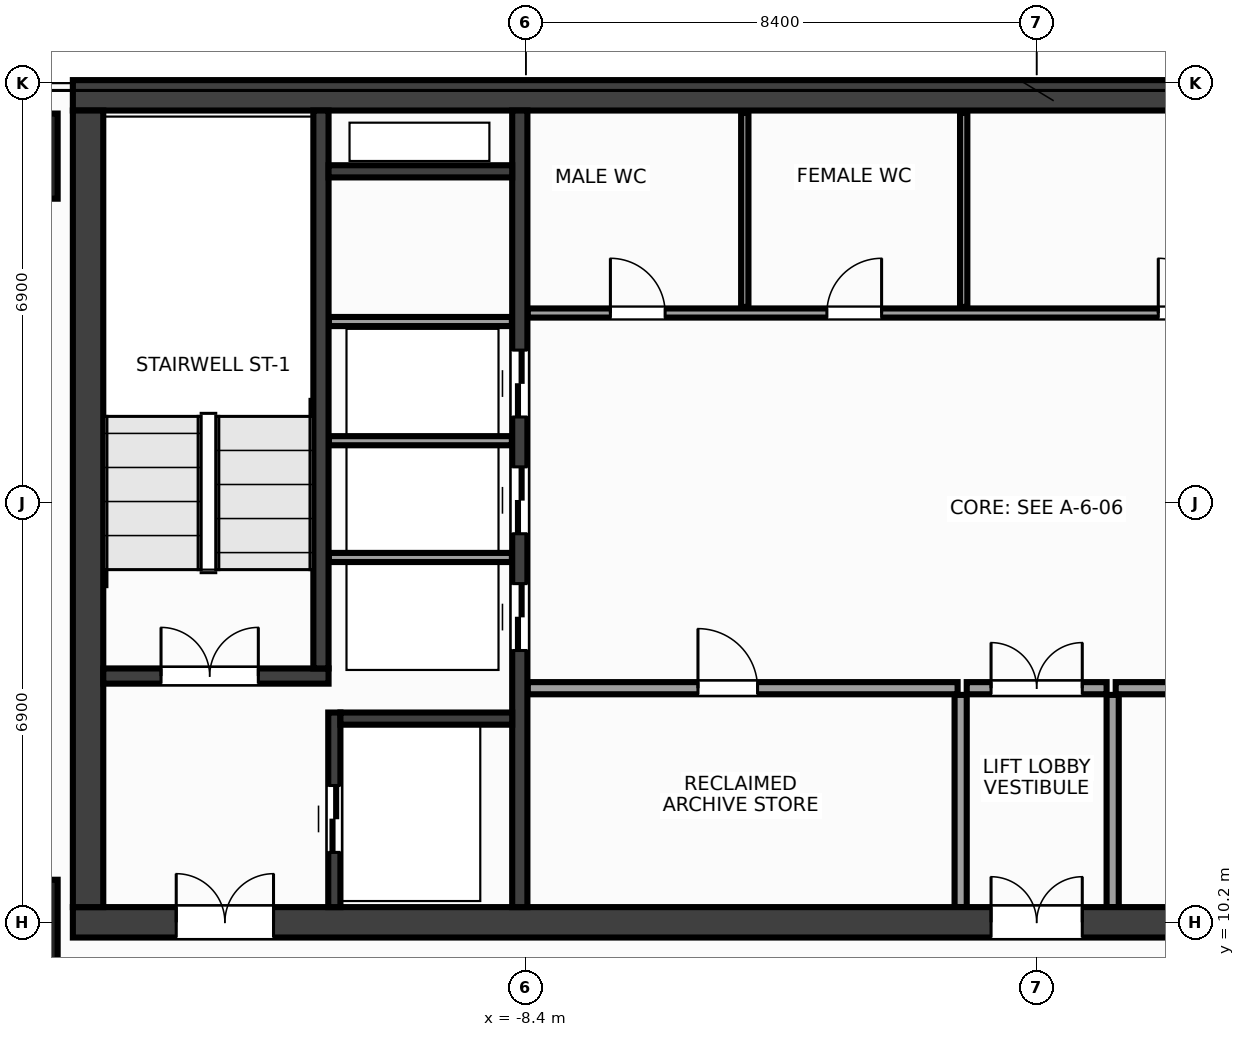
"""IFC4 building model, lengths in metres.
Left out: names, types, materials, properties, quantities, classifications, styles, units other than length and angle.
Written with IfcOpenShell. Run it as: python <this file> out.ifc"""

import sys

from ifc_helpers import new_model, si_unit, direction, frame, frame_2d, origin, origin_2d, place, context, subcontext, project, spatial, rectangle, extrude, source, transform, mapped, element, fill, save


model = new_model("IFC4")
c1 = context("Model", 3, precision=1e-05, world=origin(), true_north=direction((0.0, 1.0)))
c2 = subcontext(c1, "Body", "Model", "MODEL_VIEW")
j1 = project(units=[si_unit("LENGTHUNIT", "METRE"), si_unit("PLANEANGLEUNIT", "RADIAN")], contexts=[c1])
p1 = place(None, origin())
s1 = spatial("IfcSite", under=j1, at=p1, CompositionType="ELEMENT")
p2 = place(p1, origin())
s2 = spatial("IfcBuilding", under=s1, at=p2, CompositionType="ELEMENT")
p3 = place(p2, frame((0.0, 0.0, 203.6)))
s3 = spatial("IfcBuildingStorey", under=s2, at=p3, CompositionType="ELEMENT", Elevation=203.6)
m1 = source(origin(), c2, "Body", "SweptSolid", [
    extrude(rectangle(XDim=31.7, YDim=0.5, at=frame_2d((15.85, 0.0))), origin(), (0.0, 0.0, 1.0), 3.6),
])
p4 = place(p3, frame((-15.85, 23.8, 0.0), z_axis=(0.0, 0.0, 1.0), x_axis=(1.0, 0.0, 0.0)))
e1 = element("IfcWall", 1, at=p4, inside=s3, PredefinedType="SHEAR", context=c2, shape_type="MappedRepresentation", body=[
    mapped(m1, transform((0.0, 0.0, 0.0), x_axis=(1.0, 0.0, 0.0), y_axis=(0.0, 1.0, 0.0), z_axis=(0.0, 0.0, 1.0), scale=1.0)),
])
p5 = place(p3, frame((-15.85, 10.2, 0.0), z_axis=(0.0, 0.0, 1.0), x_axis=(1.0, 0.0, 0.0)))
e2 = element("IfcWall", 2, at=p5, inside=s3, PredefinedType="SHEAR", context=c2, shape_type="MappedRepresentation", body=[
    mapped(m1, transform((0.0, 0.0, 0.0), x_axis=(1.0, 0.0, 0.0), y_axis=(0.0, 1.0, 0.0), z_axis=(0.0, 0.0, 1.0), scale=1.0)),
])
p6 = place(p5, frame((1.7, 0.0, 0.0)))
e3 = element("IfcOpeningElement", 3, at=p6, cuts=e2, PredefinedType="OPENING", context=c2, shape_type="SweptSolid", body=[
    extrude(rectangle(XDim=1.6, YDim=2.15, at=frame_2d((0.8, 1.075))), frame((0.0, 0.262, 0.0), z_axis=(0.0, -1.0, 0.0), x_axis=(1.0, 0.0, 0.0)), (0.0, 0.0, 1.0), 0.524),
])
p7 = place(p5, frame((28.4, 0.0, 0.0)))
e4 = element("IfcOpeningElement", 4, at=p7, cuts=e2, PredefinedType="OPENING", context=c2, shape_type="SweptSolid", body=[
    extrude(rectangle(XDim=1.6, YDim=2.15, at=frame_2d((0.8, 1.075))), frame((0.0, 0.262, 0.0), z_axis=(0.0, -1.0, 0.0), x_axis=(1.0, 0.0, 0.0)), (0.0, 0.0, 1.0), 0.524),
])
p8 = place(p5, frame((15.1, 0.0, 0.0)))
e5 = element("IfcOpeningElement", 5, at=p8, cuts=e2, PredefinedType="OPENING", context=c2, shape_type="SweptSolid", body=[
    extrude(rectangle(XDim=1.5, YDim=2.2, at=frame_2d((0.75, 1.1))), frame((0.0, 0.262, 0.0), z_axis=(0.0, -1.0, 0.0), x_axis=(1.0, 0.0, 0.0)), (0.0, 0.0, 1.0), 0.524),
])
m2 = source(origin(), c2, "Body", "SweptSolid", [
    extrude(rectangle(XDim=13.1, YDim=0.5, at=frame_2d((6.55, 0.0))), origin(), (0.0, 0.0, 1.0), 3.6),
])
p9 = place(p3, frame((-15.6, 10.45, 0.0), z_axis=(0.0, 0.0, 1.0), x_axis=(0.0, 1.0, 0.0)))
e6 = element("IfcWall", 6, at=p9, inside=s3, PredefinedType="SHEAR", context=c2, shape_type="MappedRepresentation", body=[
    mapped(m2, transform((0.0, 0.0, 0.0), x_axis=(1.0, 0.0, 0.0), y_axis=(0.0, 1.0, 0.0), z_axis=(0.0, 0.0, 1.0), scale=1.0)),
])
m3 = source(origin(), c2, "Body", "SweptSolid", [
    extrude(rectangle(XDim=13.1, YDim=0.25, at=frame_2d((6.55, 0.0))), origin(), (0.0, 0.0, 1.0), 3.6),
])
p10 = place(p3, frame((-8.5, 10.45, 0.0), z_axis=(0.0, 0.0, 1.0), x_axis=(0.0, 1.0, 0.0)))
e7 = element("IfcWall", 7, at=p10, inside=s3, PredefinedType="SHEAR", context=c2, shape_type="MappedRepresentation", body=[
    mapped(m3, transform((0.0, 0.0, 0.0), x_axis=(1.0, 0.0, 0.0), y_axis=(0.0, 1.0, 0.0), z_axis=(0.0, 0.0, 1.0), scale=1.0)),
])
p11 = place(p10, frame((4.22, 0.0, 0.0)))
e8 = element("IfcOpeningElement", 8, at=p11, cuts=e7, PredefinedType="OPENING", context=c2, shape_type="SweptSolid", body=[
    extrude(rectangle(XDim=1.1, YDim=2.15, at=frame_2d((0.55, 1.075))), frame((0.0, 0.137, 0.0), z_axis=(0.0, -1.0, 0.0), x_axis=(1.0, 0.0, 0.0)), (0.0, 0.0, 1.0), 0.274),
])
p12 = place(p10, frame((6.14, 0.0, 0.0)))
e9 = element("IfcOpeningElement", 9, at=p12, cuts=e7, PredefinedType="OPENING", context=c2, shape_type="SweptSolid", body=[
    extrude(rectangle(XDim=1.1, YDim=2.15, at=frame_2d((0.55, 1.075))), frame((0.0, 0.137, 0.0), z_axis=(0.0, -1.0, 0.0), x_axis=(1.0, 0.0, 0.0)), (0.0, 0.0, 1.0), 0.274),
])
p13 = place(p10, frame((8.06, 0.0, 0.0)))
e10 = element("IfcOpeningElement", 10, at=p13, cuts=e7, PredefinedType="OPENING", context=c2, shape_type="SweptSolid", body=[
    extrude(rectangle(XDim=1.1, YDim=2.15, at=frame_2d((0.55, 1.075))), frame((0.0, 0.137, 0.0), z_axis=(0.0, -1.0, 0.0), x_axis=(1.0, 0.0, 0.0)), (0.0, 0.0, 1.0), 0.274),
])
m4 = source(origin(), c2, "Body", "SweptSolid", [
    extrude(rectangle(XDim=3.705, YDim=0.25, at=frame_2d((1.853, 0.0))), origin(), (0.0, 0.0, 1.0), 3.6),
])
p14 = place(p3, frame((-15.35, 14.25, 0.0), z_axis=(0.0, 0.0, 1.0), x_axis=(1.0, 0.0, 0.0)))
e11 = element("IfcWall", 11, at=p14, inside=s3, PredefinedType="SHEAR", context=c2, shape_type="MappedRepresentation", body=[
    mapped(m4, transform((0.0, 0.0, 0.0), x_axis=(1.0, 0.0, 0.0), y_axis=(0.0, 1.0, 0.0), z_axis=(0.0, 0.0, 1.0), scale=1.0)),
])
p15 = place(p14, frame((0.95, 0.0, 0.0)))
e12 = element("IfcOpeningElement", 12, at=p15, cuts=e11, PredefinedType="OPENING", context=c2, shape_type="SweptSolid", body=[
    extrude(rectangle(XDim=1.6, YDim=2.15, at=frame_2d((0.8, 1.075))), frame((0.0, 0.137, 0.0), z_axis=(0.0, -1.0, 0.0), x_axis=(1.0, 0.0, 0.0)), (0.0, 0.0, 1.0), 0.274),
])
m5 = source(origin(), c2, "Body", "SweptSolid", [
    extrude(rectangle(XDim=9.175, YDim=0.25, at=frame_2d((4.587, 0.0))), origin(), (0.0, 0.0, 1.0), 3.6),
])
p16 = place(p3, frame((-11.77, 14.375, 0.0), z_axis=(0.0, 0.0, 1.0), x_axis=(0.0, 1.0, 0.0)))
e13 = element("IfcWall", 13, at=p16, inside=s3, PredefinedType="SHEAR", context=c2, shape_type="MappedRepresentation", body=[
    mapped(m5, transform((0.0, 0.0, 0.0), x_axis=(1.0, 0.0, 0.0), y_axis=(0.0, 1.0, 0.0), z_axis=(0.0, 0.0, 1.0), scale=1.0)),
])
m6 = source(origin(), c2, "Body", "SweptSolid", [
    extrude(rectangle(XDim=3.2, YDim=0.2, at=frame_2d((1.6, 0.0))), origin(), (0.0, 0.0, 1.0), 3.6),
])
p17 = place(p3, frame((-11.55, 10.45, 0.0), z_axis=(0.0, 0.0, 1.0), x_axis=(0.0, 1.0, 0.0)))
e14 = element("IfcWall", 14, at=p17, inside=s3, PredefinedType="SHEAR", context=c2, shape_type="MappedRepresentation", body=[
    mapped(m6, transform((0.0, 0.0, 0.0), x_axis=(1.0, 0.0, 0.0), y_axis=(0.0, 1.0, 0.0), z_axis=(0.0, 0.0, 1.0), scale=1.0)),
])
p18 = place(p17, frame((0.9, 0.0, 0.0)))
e15 = element("IfcOpeningElement", 15, at=p18, cuts=e14, PredefinedType="OPENING", context=c2, shape_type="SweptSolid", body=[
    extrude(rectangle(XDim=1.1, YDim=2.15, at=frame_2d((0.55, 1.075))), frame((0.0, 0.112, 0.0), z_axis=(0.0, -1.0, 0.0), x_axis=(1.0, 0.0, 0.0)), (0.0, 0.0, 1.0), 0.224),
])
m7 = source(origin(), c2, "Body", "SweptSolid", [
    extrude(rectangle(XDim=2.825, YDim=0.2, at=frame_2d((1.413, 0.0))), origin(), (0.0, 0.0, 1.0), 3.6),
])
p19 = place(p3, frame((-11.45, 13.55, 0.0), z_axis=(0.0, 0.0, 1.0), x_axis=(1.0, 0.0, 0.0)))
e16 = element("IfcWall", 16, at=p19, inside=s3, PredefinedType="SHEAR", context=c2, shape_type="MappedRepresentation", body=[
    mapped(m7, transform((0.0, 0.0, 0.0), x_axis=(1.0, 0.0, 0.0), y_axis=(0.0, 1.0, 0.0), z_axis=(0.0, 0.0, 1.0), scale=1.0)),
])
m8 = source(origin(), c2, "Body", "SweptSolid", [
    extrude(rectangle(XDim=3.02, YDim=0.2, at=frame_2d((1.51, 0.0))), origin(), (0.0, 0.0, 1.0), 3.6),
])
p20 = place(p3, frame((-11.645, 22.55, 0.0), z_axis=(0.0, 0.0, 1.0), x_axis=(1.0, 0.0, 0.0)))
e17 = element("IfcWall", 17, at=p20, inside=s3, PredefinedType="SHEAR", context=c2, shape_type="MappedRepresentation", body=[
    mapped(m8, transform((0.0, 0.0, 0.0), x_axis=(1.0, 0.0, 0.0), y_axis=(0.0, 1.0, 0.0), z_axis=(0.0, 0.0, 1.0), scale=1.0)),
])
m9 = source(origin(), c2, "Body", "SweptSolid", [
    extrude(rectangle(XDim=1.4, YDim=1.4, at=origin_2d()), origin(), (0.0, 0.0, 1.0), 3.6),
])
for number, where, z_axis, x_axis in (
    (18, (-16.8, 10.2, 0.0), (0.0, 0.0, 1.0), (1.0, 0.0, 0.0)),
    (19, (-16.8, 22.8, 0.0), (0.0, 0.0, 1.0), (1.0, 0.0, 0.0)),
):
    element("IfcColumn", number, at=place(p3, frame(where, z_axis=z_axis, x_axis=x_axis)), inside=s3, PredefinedType="COLUMN", context=c2, shape_type="MappedRepresentation", body=[
        mapped(m9, transform((0.0, 0.0, 0.0), x_axis=(1.0, 0.0, 0.0), y_axis=(0.0, 1.0, 0.0), z_axis=(0.0, 0.0, 1.0), scale=1.0)),
    ])
m10 = source(origin(), c2, "Body", "SweptSolid", [
    extrude(rectangle(XDim=3.01, YDim=0.15, at=frame_2d((1.505, 0.0))), origin(), (0.0, 0.0, 1.0), 3.38),
])
for number, where, z_axis, x_axis in (
    (20, (-11.64, 16.2, 0.0), (0.0, 0.0, 1.0), (1.0, 0.0, 0.0)),
    (21, (-11.64, 18.12, 0.0), (0.0, 0.0, 1.0), (1.0, 0.0, 0.0)),
    (22, (-11.64, 20.08, 0.0), (0.0, 0.0, 1.0), (1.0, 0.0, 0.0)),
):
    element("IfcWall", number, at=place(p3, frame(where, z_axis=z_axis, x_axis=x_axis)), inside=s3, PredefinedType="PARTITIONING", context=c2, shape_type="MappedRepresentation", body=[
        mapped(m10, transform((0.0, 0.0, 0.0), x_axis=(1.0, 0.0, 0.0), y_axis=(0.0, 1.0, 0.0), z_axis=(0.0, 0.0, 1.0), scale=1.0)),
    ])
m11 = source(origin(), c2, "Body", "SweptSolid", [
    extrude(rectangle(XDim=7.07, YDim=0.2, at=frame_2d((3.535, 0.0))), origin(), (0.0, 0.0, 1.0), 3.38),
])
p21 = place(p3, frame((-8.37, 14.05, 0.0), z_axis=(0.0, 0.0, 1.0), x_axis=(1.0, 0.0, 0.0)))
e23 = element("IfcWall", 23, at=p21, inside=s3, PredefinedType="PARTITIONING", context=c2, shape_type="MappedRepresentation", body=[
    mapped(m11, transform((0.0, 0.0, 0.0), x_axis=(1.0, 0.0, 0.0), y_axis=(0.0, 1.0, 0.0), z_axis=(0.0, 0.0, 1.0), scale=1.0)),
])
p22 = place(p21, frame((2.8, 0.0, 0.0)))
e24 = element("IfcOpeningElement", 24, at=p22, cuts=e23, PredefinedType="OPENING", context=c2, shape_type="SweptSolid", body=[
    extrude(rectangle(XDim=0.98, YDim=2.15, at=frame_2d((0.49, 1.075))), frame((0.0, 0.112, 0.0), z_axis=(0.0, -1.0, 0.0), x_axis=(1.0, 0.0, 0.0)), (0.0, 0.0, 1.0), 0.224),
])
p23 = place(p3, frame((1.3, 14.05, 0.0), z_axis=(0.0, 0.0, 1.0), x_axis=(1.0, 0.0, 0.0)))
e25 = element("IfcWall", 25, at=p23, inside=s3, PredefinedType="PARTITIONING", context=c2, shape_type="MappedRepresentation", body=[
    mapped(m11, transform((0.0, 0.0, 0.0), x_axis=(1.0, 0.0, 0.0), y_axis=(0.0, 1.0, 0.0), z_axis=(0.0, 0.0, 1.0), scale=1.0)),
])
p24 = place(p23, frame((2.8, 0.0, 0.0)))
e26 = element("IfcOpeningElement", 26, at=p24, cuts=e25, PredefinedType="OPENING", context=c2, shape_type="SweptSolid", body=[
    extrude(rectangle(XDim=0.98, YDim=2.15, at=frame_2d((0.49, 1.075))), frame((0.0, 0.112, 0.0), z_axis=(0.0, -1.0, 0.0), x_axis=(1.0, 0.0, 0.0)), (0.0, 0.0, 1.0), 0.224),
])
m12 = source(origin(), c2, "Body", "SweptSolid", [
    extrude(rectangle(XDim=3.49, YDim=0.2, at=frame_2d((1.745, 0.0))), origin(), (0.0, 0.0, 1.0), 3.38),
])
for number, where, z_axis, x_axis in (
    (27, (-1.25, 10.45, 0.0), (0.0, 0.0, 1.0), (0.0, 1.0, 0.0)),
    (28, (1.25, 10.45, 0.0), (0.0, 0.0, 1.0), (0.0, 1.0, 0.0)),
):
    element("IfcWall", number, at=place(p3, frame(where, z_axis=z_axis, x_axis=x_axis)), inside=s3, PredefinedType="PARTITIONING", context=c2, shape_type="MappedRepresentation", body=[
        mapped(m12, transform((0.0, 0.0, 0.0), x_axis=(1.0, 0.0, 0.0), y_axis=(0.0, 1.0, 0.0), z_axis=(0.0, 0.0, 1.0), scale=1.0)),
    ])
m13 = source(origin(), c2, "Body", "SweptSolid", [
    extrude(rectangle(XDim=2.3, YDim=0.2, at=frame_2d((1.15, 0.0))), origin(), (0.0, 0.0, 1.0), 3.38),
])
p25 = place(p3, frame((-1.15, 14.05, 0.0), z_axis=(0.0, 0.0, 1.0), x_axis=(1.0, 0.0, 0.0)))
e29 = element("IfcWall", 29, at=p25, inside=s3, PredefinedType="PARTITIONING", context=c2, shape_type="MappedRepresentation", body=[
    mapped(m13, transform((0.0, 0.0, 0.0), x_axis=(1.0, 0.0, 0.0), y_axis=(0.0, 1.0, 0.0), z_axis=(0.0, 0.0, 1.0), scale=1.0)),
])
p26 = place(p25, frame((0.4, 0.0, 0.0)))
e30 = element("IfcOpeningElement", 30, at=p26, cuts=e29, PredefinedType="OPENING", context=c2, shape_type="SweptSolid", body=[
    extrude(rectangle(XDim=1.5, YDim=2.2, at=frame_2d((0.75, 1.1))), frame((0.0, 0.112, 0.0), z_axis=(0.0, -1.0, 0.0), x_axis=(1.0, 0.0, 0.0)), (0.0, 0.0, 1.0), 0.224),
])
m14 = source(origin(), c2, "Body", "SweptSolid", [
    extrude(rectangle(XDim=14.59, YDim=0.15, at=frame_2d((7.295, 0.0))), origin(), (0.0, 0.0, 1.0), 3.38),
])
p27 = place(p3, frame((-8.37, 20.22, 0.0), z_axis=(0.0, 0.0, 1.0), x_axis=(1.0, 0.0, 0.0)))
e31 = element("IfcWall", 31, at=p27, inside=s3, PredefinedType="PARTITIONING", context=c2, shape_type="MappedRepresentation", body=[
    mapped(m14, transform((0.0, 0.0, 0.0), x_axis=(1.0, 0.0, 0.0), y_axis=(0.0, 1.0, 0.0), z_axis=(0.0, 0.0, 1.0), scale=1.0)),
])
p28 = place(p27, frame((1.36, 0.0, 0.0)))
e32 = element("IfcOpeningElement", 32, at=p28, cuts=e31, PredefinedType="OPENING", context=c2, shape_type="SweptSolid", body=[
    extrude(rectangle(XDim=0.9, YDim=2.15, at=frame_2d((0.45, 1.075))), frame((0.0, 0.087, 0.0), z_axis=(0.0, -1.0, 0.0), x_axis=(1.0, 0.0, 0.0)), (0.0, 0.0, 1.0), 0.174),
])
p29 = place(p27, frame((4.92, 0.0, 0.0)))
e33 = element("IfcOpeningElement", 33, at=p29, cuts=e31, PredefinedType="OPENING", context=c2, shape_type="SweptSolid", body=[
    extrude(rectangle(XDim=0.9, YDim=2.15, at=frame_2d((0.45, 1.075))), frame((0.0, 0.087, 0.0), z_axis=(0.0, -1.0, 0.0), x_axis=(1.0, 0.0, 0.0)), (0.0, 0.0, 1.0), 0.174),
])
p30 = place(p27, frame((10.37, 0.0, 0.0)))
e34 = element("IfcOpeningElement", 34, at=p30, cuts=e31, PredefinedType="OPENING", context=c2, shape_type="SweptSolid", body=[
    extrude(rectangle(XDim=0.9, YDim=2.15, at=frame_2d((0.45, 1.075))), frame((0.0, 0.087, 0.0), z_axis=(0.0, -1.0, 0.0), x_axis=(1.0, 0.0, 0.0)), (0.0, 0.0, 1.0), 0.174),
])
m15 = source(origin(), c2, "Body", "SweptSolid", [
    extrude(rectangle(XDim=3.19, YDim=0.12, at=frame_2d((1.595, 0.0))), origin(), (0.0, 0.0, 1.0), 3.38),
])
for number, where, z_axis, x_axis in (
    (35, (-4.8, 20.32, 0.0), (0.0, 0.0, 1.0), (0.0, 1.0, 0.0)),
    (36, (-1.2, 20.32, 0.0), (0.0, 0.0, 1.0), (0.0, 1.0, 0.0)),
):
    element("IfcWall", number, at=place(p3, frame(where, z_axis=z_axis, x_axis=x_axis)), inside=s3, PredefinedType="PARTITIONING", context=c2, shape_type="MappedRepresentation", body=[
        mapped(m15, transform((0.0, 0.0, 0.0), x_axis=(1.0, 0.0, 0.0), y_axis=(0.0, 1.0, 0.0), z_axis=(0.0, 0.0, 1.0), scale=1.0)),
    ])
m16 = source(origin(), c2, "Body", "SweptSolid", [
    extrude(rectangle(XDim=1.6, YDim=2.15, at=frame_2d((0.8, 1.075))), frame((0.0, 0.025, 0.0), z_axis=(0.0, -1.0, 0.0), x_axis=(1.0, 0.0, 0.0)), (0.0, 0.0, 1.0), 0.05),
])
p31 = place(p15, origin())
e37 = element("IfcDoor", 37, at=p31, inside=s3, OperationType="DOUBLE_DOOR_SINGLE_SWING", PredefinedType="DOOR", context=c2, shape_type="MappedRepresentation", body=[
    mapped(m16, transform((0.0, 0.0, 0.0), x_axis=(1.0, 0.0, 0.0), y_axis=(0.0, 1.0, 0.0), z_axis=(0.0, 0.0, 1.0), scale=1.0)),
])
fill(e12, e37)
p32 = place(p6, origin())
e38 = element("IfcDoor", 38, at=p32, inside=s3, OperationType="DOUBLE_DOOR_SINGLE_SWING", PredefinedType="DOOR", context=c2, shape_type="MappedRepresentation", body=[
    mapped(m16, transform((0.0, 0.0, 0.0), x_axis=(1.0, 0.0, 0.0), y_axis=(0.0, 1.0, 0.0), z_axis=(0.0, 0.0, 1.0), scale=1.0)),
])
fill(e3, e38)
m17 = source(origin(), c2, "Body", "SweptSolid", [
    extrude(rectangle(XDim=1.1, YDim=2.15, at=frame_2d((0.55, 1.075))), frame((0.0, 0.025, 0.0), z_axis=(0.0, -1.0, 0.0), x_axis=(1.0, 0.0, 0.0)), (0.0, 0.0, 1.0), 0.05),
])
p33 = place(p18, origin())
e39 = element("IfcDoor", 39, at=p33, inside=s3, OperationType="DOUBLE_DOOR_SLIDING", PredefinedType="DOOR", context=c2, shape_type="MappedRepresentation", body=[
    mapped(m17, transform((0.0, 0.0, 0.0), x_axis=(1.0, 0.0, 0.0), y_axis=(0.0, 1.0, 0.0), z_axis=(0.0, 0.0, 1.0), scale=1.0)),
])
fill(e15, e39)
p34 = place(p11, origin())
e40 = element("IfcDoor", 40, at=p34, inside=s3, OperationType="DOUBLE_DOOR_SLIDING", PredefinedType="DOOR", context=c2, shape_type="MappedRepresentation", body=[
    mapped(m17, transform((0.0, 0.0, 0.0), x_axis=(1.0, 0.0, 0.0), y_axis=(0.0, 1.0, 0.0), z_axis=(0.0, 0.0, 1.0), scale=1.0)),
])
fill(e8, e40)
p35 = place(p12, origin())
e41 = element("IfcDoor", 41, at=p35, inside=s3, OperationType="DOUBLE_DOOR_SLIDING", PredefinedType="DOOR", context=c2, shape_type="MappedRepresentation", body=[
    mapped(m17, transform((0.0, 0.0, 0.0), x_axis=(1.0, 0.0, 0.0), y_axis=(0.0, 1.0, 0.0), z_axis=(0.0, 0.0, 1.0), scale=1.0)),
])
fill(e9, e41)
p36 = place(p13, origin())
e42 = element("IfcDoor", 42, at=p36, inside=s3, OperationType="DOUBLE_DOOR_SLIDING", PredefinedType="DOOR", context=c2, shape_type="MappedRepresentation", body=[
    mapped(m17, transform((0.0, 0.0, 0.0), x_axis=(1.0, 0.0, 0.0), y_axis=(0.0, 1.0, 0.0), z_axis=(0.0, 0.0, 1.0), scale=1.0)),
])
fill(e10, e42)
m18 = source(origin(), c2, "Body", "SweptSolid", [
    extrude(rectangle(XDim=0.98, YDim=2.15, at=frame_2d((0.49, 1.075))), frame((0.0, 0.025, 0.0), z_axis=(0.0, -1.0, 0.0), x_axis=(1.0, 0.0, 0.0)), (0.0, 0.0, 1.0), 0.05),
])
p37 = place(p22, origin())
e43 = element("IfcDoor", 43, at=p37, inside=s3, OperationType="SINGLE_SWING_LEFT", PredefinedType="DOOR", context=c2, shape_type="MappedRepresentation", body=[
    mapped(m18, transform((0.0, 0.0, 0.0), x_axis=(1.0, 0.0, 0.0), y_axis=(0.0, 1.0, 0.0), z_axis=(0.0, 0.0, 1.0), scale=1.0)),
])
fill(e24, e43)
m19 = source(origin(), c2, "Body", "SweptSolid", [
    extrude(rectangle(XDim=1.5, YDim=2.2, at=frame_2d((0.75, 1.1))), frame((0.0, 0.025, 0.0), z_axis=(0.0, -1.0, 0.0), x_axis=(1.0, 0.0, 0.0)), (0.0, 0.0, 1.0), 0.05),
])
p38 = place(p26, origin())
e44 = element("IfcDoor", 44, at=p38, inside=s3, OperationType="DOUBLE_DOOR_SINGLE_SWING", PredefinedType="DOOR", context=c2, shape_type="MappedRepresentation", body=[
    mapped(m19, transform((0.0, 0.0, 0.0), x_axis=(1.0, 0.0, 0.0), y_axis=(0.0, 1.0, 0.0), z_axis=(0.0, 0.0, 1.0), scale=1.0)),
])
fill(e30, e44)
p39 = place(p8, origin())
e45 = element("IfcDoor", 45, at=p39, inside=s3, OperationType="DOUBLE_DOOR_SINGLE_SWING", PredefinedType="DOOR", context=c2, shape_type="MappedRepresentation", body=[
    mapped(m19, transform((0.0, 0.0, 0.0), x_axis=(1.0, 0.0, 0.0), y_axis=(0.0, 1.0, 0.0), z_axis=(0.0, 0.0, 1.0), scale=1.0)),
])
fill(e5, e45)
m20 = source(origin(), c2, "Body", "SweptSolid", [
    extrude(rectangle(XDim=0.9, YDim=2.15, at=frame_2d((0.45, 1.075))), frame((0.0, 0.025, 0.0), z_axis=(0.0, -1.0, 0.0), x_axis=(1.0, 0.0, 0.0)), (0.0, 0.0, 1.0), 0.05),
])
p40 = place(p28, origin())
e46 = element("IfcDoor", 46, at=p40, inside=s3, OperationType="SINGLE_SWING_LEFT", PredefinedType="DOOR", context=c2, shape_type="MappedRepresentation", body=[
    mapped(m20, transform((0.0, 0.0, 0.0), x_axis=(1.0, 0.0, 0.0), y_axis=(0.0, 1.0, 0.0), z_axis=(0.0, 0.0, 1.0), scale=1.0)),
])
fill(e32, e46)
p41 = place(p29, origin())
e47 = element("IfcDoor", 47, at=p41, inside=s3, OperationType="SINGLE_SWING_RIGHT", PredefinedType="DOOR", context=c2, shape_type="MappedRepresentation", body=[
    mapped(m20, transform((0.0, 0.0, 0.0), x_axis=(1.0, 0.0, 0.0), y_axis=(0.0, 1.0, 0.0), z_axis=(0.0, 0.0, 1.0), scale=1.0)),
])
fill(e33, e47)
p42 = place(p30, origin())
e48 = element("IfcDoor", 48, at=p42, inside=s3, OperationType="SINGLE_SWING_LEFT", PredefinedType="DOOR", context=c2, shape_type="MappedRepresentation", body=[
    mapped(m20, transform((0.0, 0.0, 0.0), x_axis=(1.0, 0.0, 0.0), y_axis=(0.0, 1.0, 0.0), z_axis=(0.0, 0.0, 1.0), scale=1.0)),
])
fill(e34, e48)
save(model, sys.argv[1])
